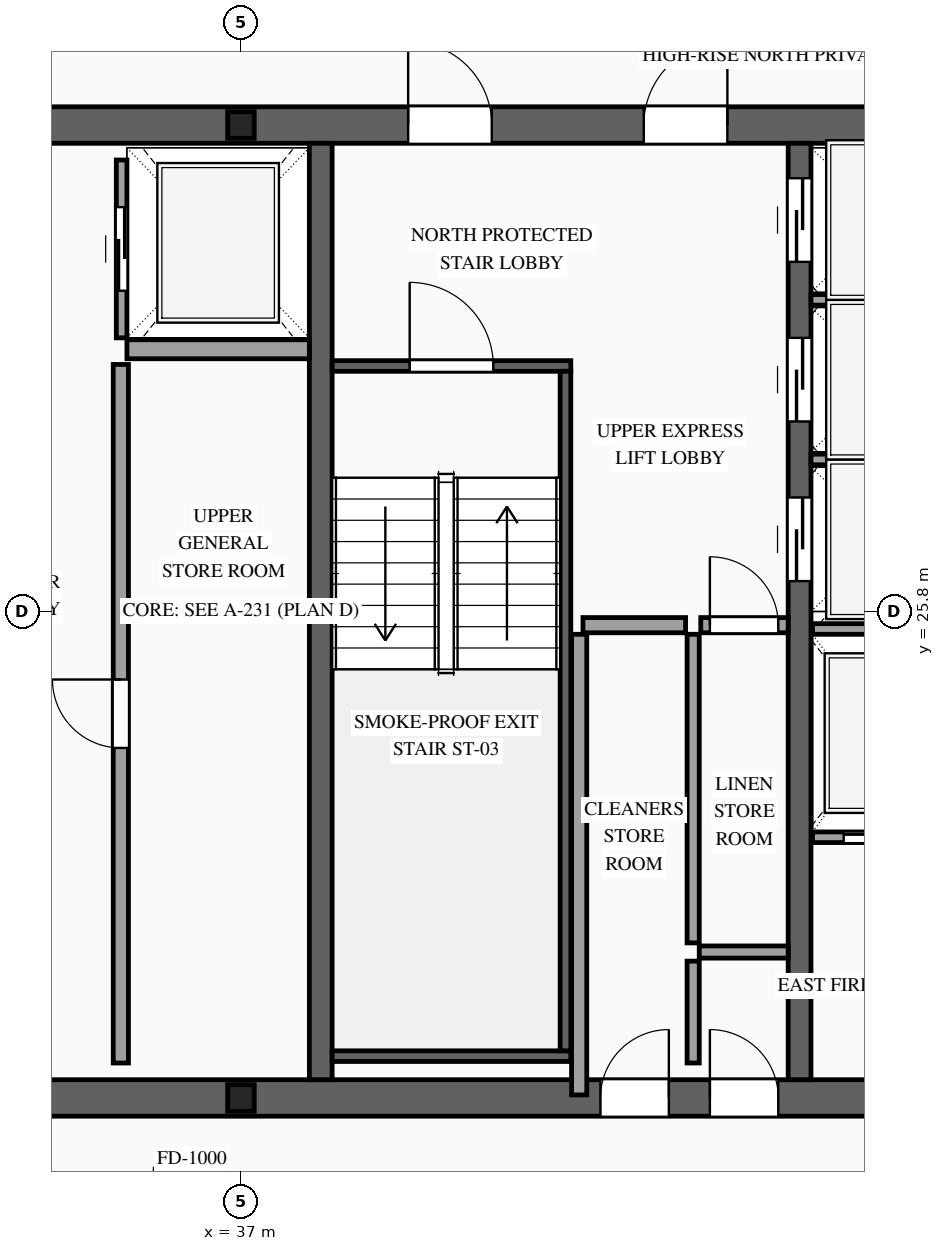
"""IFC4 building model, lengths in metres.
Left out: names, types, materials, properties, quantities, classifications, styles, units other than length and angle.
Written with IfcOpenShell. Run it as: python <this file> out.ifc"""

import sys

from ifc_helpers import new_model, si_unit, direction, frame, frame_2d, origin, origin_2d, place, context, subcontext, project, spatial, rectangle, i_section, extrude, source, transform, mapped, element, fill, save


model = new_model("IFC4")
c1 = context("Model", 3, precision=1e-05, world=origin(), true_north=direction((0.0, 1.0)))
c2 = subcontext(c1, "Body", "Model", "MODEL_VIEW")
j1 = project(units=[si_unit("LENGTHUNIT", "METRE"), si_unit("PLANEANGLEUNIT", "RADIAN")], contexts=[c1])
p1 = place(None, origin())
s1 = spatial("IfcSite", under=j1, at=p1, CompositionType="ELEMENT")
p2 = place(p1, origin())
s2 = spatial("IfcBuilding", under=s1, at=p2, CompositionType="ELEMENT")
p3 = place(p2, frame((0.0, 0.0, 292.6)))
s3 = spatial("IfcBuildingStorey", under=s2, at=p3, CompositionType="ELEMENT", Elevation=292.6)
p4 = place(p3, frame((23.56, 19.4, 0.0), z_axis=(0.0, 0.0, 1.0), x_axis=(1.0, 0.0, 0.0)))
e1 = element("IfcWall", 1, at=p4, inside=s3, PredefinedType="SHEAR", context=c2, shape_type="SweptSolid", body=[
    extrude(rectangle(XDim=26.88, YDim=0.48, at=frame_2d((13.44, 0.0))), origin(), (0.0, 0.0, 1.0), 3.5),
])
p5 = place(p4, frame((1.89, 0.0, 0.0)))
e2 = element("IfcOpeningElement", 2, at=p5, cuts=e1, PredefinedType="OPENING", context=c2, shape_type="SweptSolid", body=[
    extrude(rectangle(XDim=1.1, YDim=2.2, at=frame_2d((0.55, 1.1))), frame((0.0, 0.255, 0.0), z_axis=(0.0, -1.0, 0.0), x_axis=(1.0, 0.0, 0.0)), (0.0, 0.0, 1.0), 0.51),
])
p6 = place(p4, frame((9.79, 0.0, 0.0)))
e3 = element("IfcOpeningElement", 3, at=p6, cuts=e1, PredefinedType="OPENING", context=c2, shape_type="SweptSolid", body=[
    extrude(rectangle(XDim=1.1, YDim=2.2, at=frame_2d((0.55, 1.1))), frame((0.0, 0.255, 0.0), z_axis=(0.0, -1.0, 0.0), x_axis=(1.0, 0.0, 0.0)), (0.0, 0.0, 1.0), 0.51),
])
p7 = place(p4, frame((22.99, 0.0, 0.0)))
e4 = element("IfcOpeningElement", 4, at=p7, cuts=e1, PredefinedType="OPENING", context=c2, shape_type="SweptSolid", body=[
    extrude(rectangle(XDim=1.1, YDim=2.2, at=frame_2d((0.55, 1.1))), frame((0.0, 0.255, 0.0), z_axis=(0.0, -1.0, 0.0), x_axis=(1.0, 0.0, 0.0)), (0.0, 0.0, 1.0), 0.51),
])
p8 = place(p4, frame((19.61, 0.0, 0.0)))
e5 = element("IfcOpeningElement", 5, at=p8, cuts=e1, PredefinedType="OPENING", context=c2, shape_type="SweptSolid", body=[
    extrude(rectangle(XDim=0.9, YDim=2.15, at=frame_2d((0.45, 1.075))), frame((0.0, 0.255, 0.0), z_axis=(0.0, -1.0, 0.0), x_axis=(1.0, 0.0, 0.0)), (0.0, 0.0, 1.0), 0.51),
])
p9 = place(p4, frame((18.17, 0.0, 0.0)))
e6 = element("IfcOpeningElement", 6, at=p9, cuts=e1, PredefinedType="OPENING", context=c2, shape_type="SweptSolid", body=[
    extrude(rectangle(XDim=0.9, YDim=2.15, at=frame_2d((0.45, 1.075))), frame((0.0, 0.255, 0.0), z_axis=(0.0, -1.0, 0.0), x_axis=(1.0, 0.0, 0.0)), (0.0, 0.0, 1.0), 0.51),
])
p10 = place(p3, frame((23.56, 32.2, 0.0), z_axis=(0.0, 0.0, 1.0), x_axis=(1.0, 0.0, 0.0)))
e7 = element("IfcWall", 7, at=p10, inside=s3, PredefinedType="SHEAR", context=c2, shape_type="SweptSolid", body=[
    extrude(rectangle(XDim=26.88, YDim=0.48, at=frame_2d((13.44, 0.0))), origin(), (0.0, 0.0, 1.0), 3.5),
])
p11 = place(p10, frame((4.51, 0.0, 0.0)))
e8 = element("IfcOpeningElement", 8, at=p11, cuts=e7, PredefinedType="OPENING", context=c2, shape_type="SweptSolid", body=[
    extrude(rectangle(XDim=0.9, YDim=2.15, at=frame_2d((0.45, 1.075))), frame((0.0, 0.255, 0.0), z_axis=(0.0, -1.0, 0.0), x_axis=(1.0, 0.0, 0.0)), (0.0, 0.0, 1.0), 0.51),
])
p12 = place(p10, frame((9.79, 0.0, 0.0)))
e9 = element("IfcOpeningElement", 9, at=p12, cuts=e7, PredefinedType="OPENING", context=c2, shape_type="SweptSolid", body=[
    extrude(rectangle(XDim=1.1, YDim=2.2, at=frame_2d((0.55, 1.1))), frame((0.0, 0.255, 0.0), z_axis=(0.0, -1.0, 0.0), x_axis=(1.0, 0.0, 0.0)), (0.0, 0.0, 1.0), 0.51),
])
p13 = place(p10, frame((15.64, 0.0, 0.0)))
e10 = element("IfcOpeningElement", 10, at=p13, cuts=e7, PredefinedType="OPENING", context=c2, shape_type="SweptSolid", body=[
    extrude(rectangle(XDim=1.1, YDim=2.2, at=frame_2d((0.55, 1.1))), frame((0.0, 0.255, 0.0), z_axis=(0.0, -1.0, 0.0), x_axis=(1.0, 0.0, 0.0)), (0.0, 0.0, 1.0), 0.51),
])
p14 = place(p10, frame((18.74, 0.0, 0.0)))
e11 = element("IfcOpeningElement", 11, at=p14, cuts=e7, PredefinedType="OPENING", context=c2, shape_type="SweptSolid", body=[
    extrude(rectangle(XDim=1.1, YDim=2.2, at=frame_2d((0.55, 1.1))), frame((0.0, 0.255, 0.0), z_axis=(0.0, -1.0, 0.0), x_axis=(1.0, 0.0, 0.0)), (0.0, 0.0, 1.0), 0.51),
])
m1 = source(origin(), c2, "Body", "SweptSolid", [
    extrude(rectangle(XDim=12.32, YDim=0.3, at=frame_2d((6.16, 0.0))), origin(), (0.0, 0.0, 1.0), 3.5),
])
p15 = place(p3, frame((38.05, 19.64, 0.0), z_axis=(0.0, 0.0, 1.0), x_axis=(0.0, 1.0, 0.0)))
e12 = element("IfcWall", 12, at=p15, inside=s3, PredefinedType="SOLIDWALL", context=c2, shape_type="MappedRepresentation", body=[
    mapped(m1, transform((0.0, 0.0, 0.0), scale=1.0)),
])
p16 = place(p3, frame((44.35, 19.64, 0.0), z_axis=(0.0, 0.0, 1.0), x_axis=(0.0, 1.0, 0.0)))
e13 = element("IfcWall", 13, at=p16, inside=s3, PredefinedType="SOLIDWALL", context=c2, shape_type="SweptSolid", body=[
    extrude(rectangle(XDim=12.32, YDim=0.3, at=frame_2d((6.16, 0.0))), origin(), (0.0, 0.0, 1.0), 3.5),
])
p17 = place(p16, frame((6.56, 0.0, 0.0)))
e14 = element("IfcOpeningElement", 14, at=p17, cuts=e13, PredefinedType="OPENING", context=c2, shape_type="SweptSolid", body=[
    extrude(rectangle(XDim=1.1, YDim=2.2, at=frame_2d((0.55, 1.1))), frame((0.0, 0.165, 0.0), z_axis=(0.0, -1.0, 0.0), x_axis=(1.0, 0.0, 0.0)), (0.0, 0.0, 1.0), 0.33),
])
p18 = place(p16, frame((8.66, 0.0, 0.0)))
e15 = element("IfcOpeningElement", 15, at=p18, cuts=e13, PredefinedType="OPENING", context=c2, shape_type="SweptSolid", body=[
    extrude(rectangle(XDim=1.1, YDim=2.2, at=frame_2d((0.55, 1.1))), frame((0.0, 0.165, 0.0), z_axis=(0.0, -1.0, 0.0), x_axis=(1.0, 0.0, 0.0)), (0.0, 0.0, 1.0), 0.33),
])
p19 = place(p16, frame((10.76, 0.0, 0.0)))
e16 = element("IfcOpeningElement", 16, at=p19, cuts=e13, PredefinedType="OPENING", context=c2, shape_type="SweptSolid", body=[
    extrude(rectangle(XDim=1.1, YDim=2.2, at=frame_2d((0.55, 1.1))), frame((0.0, 0.165, 0.0), z_axis=(0.0, -1.0, 0.0), x_axis=(1.0, 0.0, 0.0)), (0.0, 0.0, 1.0), 0.33),
])
m2 = source(origin(), c2, "Body", "SweptSolid", [
    extrude(i_section(OverallWidth=0.35, OverallDepth=0.35, WebThickness=0.012, FlangeThickness=0.019, at=origin_2d()), origin(), (0.0, 0.0, 1.0), 3.5),
])
for number, where, z_axis, x_axis in (
    (17, (37.0, 19.4, 0.0), (0.0, 0.0, 1.0), (1.0, 0.0, 0.0)),
    (18, (37.0, 32.2, 0.0), (0.0, 0.0, 1.0), (1.0, 0.0, 0.0)),
):
    element("IfcColumn", number, at=place(p3, frame(where, z_axis=z_axis, x_axis=x_axis)), inside=s3, PredefinedType="COLUMN", context=c2, shape_type="MappedRepresentation", body=[
        mapped(m2, transform((0.0, 0.0, 0.0), scale=1.0)),
    ])
p20 = place(p3, frame((44.52, 22.83, 0.0), z_axis=(0.0, 0.0, 1.0), x_axis=(1.0, 0.0, 0.0)))
e19 = element("IfcWall", 19, at=p20, inside=s3, PredefinedType="SOLIDWALL", context=c2, shape_type="SweptSolid", body=[
    extrude(rectangle(XDim=1.92, YDim=0.14, at=frame_2d((0.96, 0.0))), origin(), (0.0, 0.0, 1.0), 3.28),
])
p21 = place(p20, frame((0.41, 0.0, 0.0)))
e20 = element("IfcOpeningElement", 20, at=p21, cuts=e19, PredefinedType="OPENING", context=c2, shape_type="SweptSolid", body=[
    extrude(rectangle(XDim=1.1, YDim=2.2, at=frame_2d((0.55, 1.1))), frame((0.0, 0.085, 0.0), z_axis=(0.0, -1.0, 0.0), x_axis=(1.0, 0.0, 0.0)), (0.0, 0.0, 1.0), 0.17),
])
m3 = source(origin(), c2, "Body", "SweptSolid", [
    extrude(rectangle(XDim=1.92, YDim=0.14, at=frame_2d((0.96, 0.0))), origin(), (0.0, 0.0, 1.0), 3.28),
])
p22 = place(p3, frame((44.52, 25.57, 0.0), z_axis=(0.0, 0.0, 1.0), x_axis=(1.0, 0.0, 0.0)))
e21 = element("IfcWall", 21, at=p22, inside=s3, PredefinedType="SOLIDWALL", context=c2, shape_type="MappedRepresentation", body=[
    mapped(m3, transform((0.0, 0.0, 0.0), scale=1.0)),
])
p23 = place(p3, frame((35.43, 29.4, 0.0), z_axis=(0.0, 0.0, 1.0), x_axis=(0.0, 1.0, 0.0)))
e22 = element("IfcWall", 22, at=p23, inside=s3, PredefinedType="SOLIDWALL", context=c2, shape_type="SweptSolid", body=[
    extrude(rectangle(XDim=2.34, YDim=0.14, at=frame_2d((1.17, 0.0))), origin(), (0.0, 0.0, 1.0), 3.28),
])
p24 = place(p23, frame((0.62, 0.0, 0.0)))
e23 = element("IfcOpeningElement", 23, at=p24, cuts=e22, PredefinedType="OPENING", context=c2, shape_type="SweptSolid", body=[
    extrude(rectangle(XDim=1.1, YDim=2.2, at=frame_2d((0.55, 1.1))), frame((0.0, 0.085, 0.0), z_axis=(0.0, -1.0, 0.0), x_axis=(1.0, 0.0, 0.0)), (0.0, 0.0, 1.0), 0.17),
])
m4 = source(origin(), c2, "Body", "SweptSolid", [
    extrude(rectangle(XDim=2.4, YDim=0.25, at=frame_2d((1.2, 0.0))), origin(), (0.0, 0.0, 1.0), 3.28),
])
p25 = place(p3, frame((35.5, 29.25, 0.0), z_axis=(0.0, 0.0, 1.0), x_axis=(1.0, 0.0, 0.0)))
e24 = element("IfcWall", 24, at=p25, inside=s3, PredefinedType="SOLIDWALL", context=c2, shape_type="MappedRepresentation", body=[
    mapped(m4, transform((0.0, 0.0, 0.0), scale=1.0)),
])
m5 = source(origin(), c2, "Body", "SweptSolid", [
    extrude(rectangle(XDim=2.0, YDim=0.14, at=frame_2d((1.0, 0.0))), origin(), (0.0, 0.0, 1.0), 3.28),
])
for number, where, z_axis, x_axis in (
    (25, (44.5, 27.8, 0.0), (0.0, 0.0, 1.0), (1.0, 0.0, 0.0)),
    (26, (44.5, 29.9, 0.0), (0.0, 0.0, 1.0), (1.0, 0.0, 0.0)),
):
    element("IfcWall", number, at=place(p3, frame(where, z_axis=z_axis, x_axis=x_axis)), inside=s3, PredefinedType="SOLIDWALL", context=c2, shape_type="MappedRepresentation", body=[
        mapped(m5, transform((0.0, 0.0, 0.0), scale=1.0)),
    ])
p26 = place(p3, frame((38.2, 29.03, 0.0), z_axis=(0.0, 0.0, 1.0), x_axis=(1.0, 0.0, 0.0)))
e27 = element("IfcWall", 27, at=p26, inside=s3, PredefinedType="SOLIDWALL", context=c2, shape_type="SweptSolid", body=[
    extrude(rectangle(XDim=3.14, YDim=0.14, at=frame_2d((1.57, 0.0))), origin(), (0.0, 0.0, 1.0), 3.28),
])
p27 = place(p26, frame((1.02, 0.0, 0.0)))
e28 = element("IfcOpeningElement", 28, at=p27, cuts=e27, PredefinedType="OPENING", context=c2, shape_type="SweptSolid", body=[
    extrude(rectangle(XDim=1.1, YDim=2.2, at=frame_2d((0.55, 1.1))), frame((0.0, 0.085, 0.0), z_axis=(0.0, -1.0, 0.0), x_axis=(1.0, 0.0, 0.0)), (0.0, 0.0, 1.0), 0.17),
])
m6 = source(origin(), c2, "Body", "SweptSolid", [
    extrude(rectangle(XDim=3.14, YDim=0.14, at=frame_2d((1.57, 0.0))), origin(), (0.0, 0.0, 1.0), 3.28),
])
p28 = place(p3, frame((38.2, 19.95, 0.0), z_axis=(0.0, 0.0, 1.0), x_axis=(1.0, 0.0, 0.0)))
e29 = element("IfcWall", 29, at=p28, inside=s3, PredefinedType="SOLIDWALL", context=c2, shape_type="MappedRepresentation", body=[
    mapped(m6, transform((0.0, 0.0, 0.0), scale=1.0)),
])
m7 = source(origin(), c2, "Body", "SweptSolid", [
    extrude(rectangle(XDim=8.94, YDim=0.14, at=frame_2d((4.47, 0.0))), origin(), (0.0, 0.0, 1.0), 3.28),
])
p29 = place(p3, frame((41.27, 20.02, 0.0), z_axis=(0.0, 0.0, 1.0), x_axis=(0.0, 1.0, 0.0)))
e30 = element("IfcWall", 30, at=p29, inside=s3, PredefinedType="SOLIDWALL", context=c2, shape_type="MappedRepresentation", body=[
    mapped(m7, transform((0.0, 0.0, 0.0), scale=1.0)),
])
p30 = place(p3, frame((35.42, 19.86, 0.0), z_axis=(0.0, 0.0, 1.0), x_axis=(0.0, 1.0, 0.0)))
e31 = element("IfcWall", 31, at=p30, inside=s3, PredefinedType="PARTITIONING", context=c2, shape_type="SweptSolid", body=[
    extrude(rectangle(XDim=9.19, YDim=0.2, at=frame_2d((4.595, 0.0))), origin(), (0.0, 0.0, 1.0), 3.28),
])
p31 = place(p30, frame((4.145, 0.0, 0.0)))
e32 = element("IfcOpeningElement", 32, at=p31, cuts=e31, PredefinedType="OPENING", context=c2, shape_type="SweptSolid", body=[
    extrude(rectangle(XDim=0.9, YDim=2.15, at=frame_2d((0.45, 1.075))), frame((0.0, 0.115, 0.0), z_axis=(0.0, -1.0, 0.0), x_axis=(1.0, 0.0, 0.0)), (0.0, 0.0, 1.0), 0.23),
])
m8 = source(origin(), c2, "Body", "SweptSolid", [
    extrude(rectangle(XDim=1.34, YDim=0.16, at=frame_2d((0.67, 0.0))), origin(), (0.0, 0.0, 1.0), 3.28),
])
p32 = place(p3, frame((42.95, 19.86, 0.0), z_axis=(0.0, 0.0, 1.0), x_axis=(0.0, 1.0, 0.0)))
e33 = element("IfcWall", 33, at=p32, inside=s3, PredefinedType="PARTITIONING", context=c2, shape_type="MappedRepresentation", body=[
    mapped(m8, transform((0.0, 0.0, 0.0), scale=1.0)),
])
m9 = source(origin(), c2, "Body", "SweptSolid", [
    extrude(rectangle(XDim=1.17, YDim=0.16, at=frame_2d((0.585, 0.0))), origin(), (0.0, 0.0, 1.0), 3.28),
])
p33 = place(p3, frame((43.03, 21.32, 0.0), z_axis=(0.0, 0.0, 1.0), x_axis=(1.0, 0.0, 0.0)))
e34 = element("IfcWall", 34, at=p33, inside=s3, PredefinedType="PARTITIONING", context=c2, shape_type="MappedRepresentation", body=[
    mapped(m9, transform((0.0, 0.0, 0.0), scale=1.0)),
])
m10 = source(origin(), c2, "Body", "SweptSolid", [
    extrude(rectangle(XDim=6.06, YDim=0.2, at=frame_2d((3.03, 0.0))), origin(), (0.0, 0.0, 1.0), 3.28),
])
p34 = place(p3, frame((41.45, 19.44, 0.0), z_axis=(0.0, 0.0, 1.0), x_axis=(0.0, 1.0, 0.0)))
e35 = element("IfcWall", 35, at=p34, inside=s3, PredefinedType="PARTITIONING", context=c2, shape_type="MappedRepresentation", body=[
    mapped(m10, transform((0.0, 0.0, 0.0), scale=1.0)),
])
m11 = source(origin(), c2, "Body", "SweptSolid", [
    extrude(rectangle(XDim=1.35, YDim=0.2, at=frame_2d((0.675, 0.0))), origin(), (0.0, 0.0, 1.0), 3.28),
])
p35 = place(p3, frame((41.5, 25.62, 0.0), z_axis=(0.0, 0.0, 1.0), x_axis=(1.0, 0.0, 0.0)))
e36 = element("IfcWall", 36, at=p35, inside=s3, PredefinedType="PARTITIONING", context=c2, shape_type="MappedRepresentation", body=[
    mapped(m11, transform((0.0, 0.0, 0.0), scale=1.0)),
])
m12 = source(origin(), c2, "Body", "SweptSolid", [
    extrude(rectangle(XDim=4.06, YDim=0.16, at=frame_2d((2.03, 0.0))), origin(), (0.0, 0.0, 1.0), 3.28),
])
p36 = place(p3, frame((42.95, 21.44, 0.0), z_axis=(0.0, 0.0, 1.0), x_axis=(0.0, 1.0, 0.0)))
e37 = element("IfcWall", 37, at=p36, inside=s3, PredefinedType="PARTITIONING", context=c2, shape_type="MappedRepresentation", body=[
    mapped(m12, transform((0.0, 0.0, 0.0), scale=1.0)),
])
p37 = place(p3, frame((43.05, 25.62, 0.0), z_axis=(0.0, 0.0, 1.0), x_axis=(1.0, 0.0, 0.0)))
e38 = element("IfcWall", 38, at=p37, inside=s3, PredefinedType="PARTITIONING", context=c2, shape_type="SweptSolid", body=[
    extrude(rectangle(XDim=1.15, YDim=0.2, at=frame_2d((0.575, 0.0))), origin(), (0.0, 0.0, 1.0), 3.28),
])
p38 = place(p37, frame((0.12, 0.0, 0.0)))
e39 = element("IfcOpeningElement", 39, at=p38, cuts=e38, PredefinedType="OPENING", context=c2, shape_type="SweptSolid", body=[
    extrude(rectangle(XDim=0.9, YDim=2.15, at=frame_2d((0.45, 1.075))), frame((0.0, 0.115, 0.0), z_axis=(0.0, -1.0, 0.0), x_axis=(1.0, 0.0, 0.0)), (0.0, 0.0, 1.0), 0.23),
])
m13 = source(origin(), c2, "Body", "SweptSolid", [
    extrude(rectangle(XDim=1.1, YDim=2.2, at=frame_2d((0.55, 1.1))), frame((0.0, 0.025, 0.0), z_axis=(0.0, -1.0, 0.0), x_axis=(1.0, 0.0, 0.0)), (0.0, 0.0, 1.0), 0.05),
])
p39 = place(p21, origin())
e40 = element("IfcDoor", 40, at=p39, inside=s3, OperationType="SLIDING_TO_RIGHT", PredefinedType="DOOR", context=c2, shape_type="MappedRepresentation", body=[
    mapped(m13, transform((0.0, 0.0, 0.0), scale=1.0)),
])
fill(e20, e40)
p40 = place(p24, origin())
e41 = element("IfcDoor", 41, at=p40, inside=s3, OperationType="SLIDING_TO_RIGHT", PredefinedType="DOOR", context=c2, shape_type="MappedRepresentation", body=[
    mapped(m13, transform((0.0, 0.0, 0.0), scale=1.0)),
])
fill(e23, e41)
p41 = place(p17, origin())
e42 = element("IfcDoor", 42, at=p41, inside=s3, OperationType="SLIDING_TO_LEFT", PredefinedType="DOOR", context=c2, shape_type="MappedRepresentation", body=[
    mapped(m13, transform((0.0, 0.0, 0.0), scale=1.0)),
])
fill(e14, e42)
p42 = place(p18, origin())
e43 = element("IfcDoor", 43, at=p42, inside=s3, OperationType="SLIDING_TO_RIGHT", PredefinedType="DOOR", context=c2, shape_type="MappedRepresentation", body=[
    mapped(m13, transform((0.0, 0.0, 0.0), scale=1.0)),
])
fill(e15, e43)
p43 = place(p19, origin())
e44 = element("IfcDoor", 44, at=p43, inside=s3, OperationType="SLIDING_TO_LEFT", PredefinedType="DOOR", context=c2, shape_type="MappedRepresentation", body=[
    mapped(m13, transform((0.0, 0.0, 0.0), scale=1.0)),
])
fill(e16, e44)
m14 = source(origin(), c2, "Body", "SweptSolid", [
    extrude(rectangle(XDim=1.1, YDim=2.2, at=frame_2d((0.55, 1.1))), frame((0.0, 0.025, 0.0), z_axis=(0.0, -1.0, 0.0), x_axis=(1.0, 0.0, 0.0)), (0.0, 0.0, 1.0), 0.05),
])
p44 = place(p27, origin())
e45 = element("IfcDoor", 45, at=p44, inside=s3, OperationType="SINGLE_SWING_LEFT", PredefinedType="DOOR", context=c2, shape_type="MappedRepresentation", body=[
    mapped(m14, transform((0.0, 0.0, 0.0), scale=1.0)),
])
fill(e28, e45)
p45 = place(p13, origin())
e46 = element("IfcDoor", 46, at=p45, inside=s3, OperationType="SINGLE_SWING_LEFT", PredefinedType="DOOR", context=c2, shape_type="MappedRepresentation", body=[
    mapped(m14, transform((0.0, 0.0, 0.0), scale=1.0)),
])
fill(e10, e46)
p46 = place(p14, origin())
e47 = element("IfcDoor", 47, at=p46, inside=s3, OperationType="SINGLE_SWING_RIGHT", PredefinedType="DOOR", context=c2, shape_type="MappedRepresentation", body=[
    mapped(m14, transform((0.0, 0.0, 0.0), scale=1.0)),
])
fill(e11, e47)
m15 = source(origin(), c2, "Body", "SweptSolid", [
    extrude(rectangle(XDim=0.9, YDim=2.15, at=frame_2d((0.45, 1.075))), frame((0.0, 0.025, 0.0), z_axis=(0.0, -1.0, 0.0), x_axis=(1.0, 0.0, 0.0)), (0.0, 0.0, 1.0), 0.05),
])
p47 = place(p31, origin())
e48 = element("IfcDoor", 48, at=p47, inside=s3, OperationType="SINGLE_SWING_RIGHT", PredefinedType="DOOR", context=c2, shape_type="MappedRepresentation", body=[
    mapped(m15, transform((0.0, 0.0, 0.0), scale=1.0)),
])
fill(e32, e48)
p48 = place(p8, origin())
e49 = element("IfcDoor", 49, at=p48, inside=s3, OperationType="SINGLE_SWING_LEFT", PredefinedType="DOOR", context=c2, shape_type="MappedRepresentation", body=[
    mapped(m15, transform((0.0, 0.0, 0.0), scale=1.0)),
])
fill(e5, e49)
p49 = place(p9, origin())
e50 = element("IfcDoor", 50, at=p49, inside=s3, OperationType="SINGLE_SWING_RIGHT", PredefinedType="DOOR", context=c2, shape_type="MappedRepresentation", body=[
    mapped(m15, transform((0.0, 0.0, 0.0), scale=1.0)),
])
fill(e6, e50)
p50 = place(p38, origin())
e51 = element("IfcDoor", 51, at=p50, inside=s3, OperationType="SINGLE_SWING_LEFT", PredefinedType="DOOR", context=c2, shape_type="MappedRepresentation", body=[
    mapped(m15, transform((0.0, 0.0, 0.0), scale=1.0)),
])
fill(e39, e51)
save(model, sys.argv[1])
